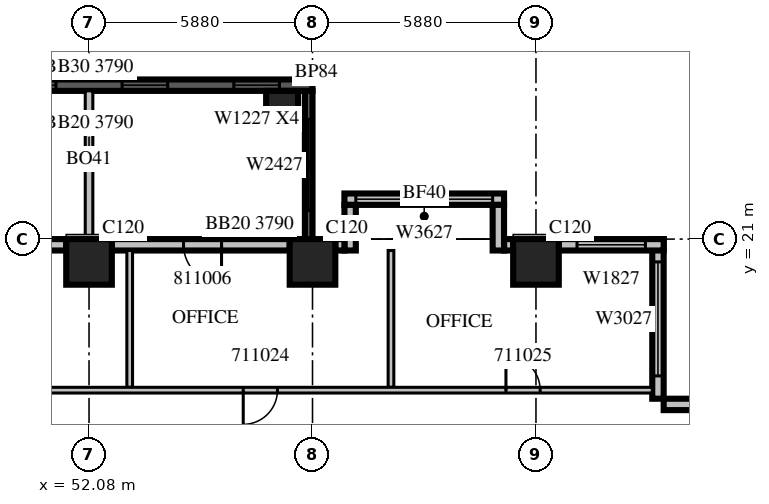
"""IFC4 building model, lengths in metres.
Left out: names, types, materials, properties, quantities, classifications, styles, units other than length and angle.
Written with IfcOpenShell. Run it as: python <this file> out.ifc"""

import sys

from ifc_helpers import new_model, si_unit, direction, frame, frame_2d, origin, origin_2d, place, context, subcontext, project, spatial, rectangle, extrude, source, transform, mapped, element, fill, save


model = new_model("IFC4")
c1 = context("Model", 3, precision=1e-05, world=origin(), true_north=direction((0.0, 1.0)))
c2 = subcontext(c1, "Body", "Model", "MODEL_VIEW")
j1 = project(units=[si_unit("LENGTHUNIT", "METRE"), si_unit("PLANEANGLEUNIT", "RADIAN")], contexts=[c1])
p1 = place(None, origin())
s1 = spatial("IfcSite", under=j1, at=p1, CompositionType="ELEMENT")
p2 = place(p1, origin())
s2 = spatial("IfcBuilding", under=s1, at=p2, CompositionType="ELEMENT")
p3 = place(p2, frame((0.0, 0.0, 57.3)))
s3 = spatial("IfcBuildingStorey", under=s2, at=p3, CompositionType="ELEMENT", Elevation=57.3)
m1 = source(origin(), c2, "Body", "SweptSolid", [
    extrude(rectangle(XDim=1.2, YDim=1.2, at=origin_2d()), origin(), (0.0, 0.0, 1.0), 4.2),
])
for number, where, z_axis, x_axis in (
    (1, (52.08, 20.4, 0.0), (0.0, 0.0, 1.0), (1.0, 0.0, 0.0)),
    (2, (57.96, 20.4, 0.0), (0.0, 0.0, 1.0), (1.0, 0.0, 0.0)),
    (3, (63.84, 20.4, 0.0), (0.0, 0.0, 1.0), (1.0, 0.0, 0.0)),
):
    element("IfcColumn", number, at=place(p3, frame(where, z_axis=z_axis, x_axis=x_axis)), inside=s3, PredefinedType="COLUMN", context=c2, shape_type="MappedRepresentation", body=[
        mapped(m1, transform((0.0, 0.0, 0.0), scale=1.0)),
    ])
m2 = source(origin(), c2, "Body", "SweptSolid", [
    extrude(rectangle(XDim=0.84, YDim=0.84, at=origin_2d()), origin(), (0.0, 0.0, 1.0), 4.2),
])
p4 = place(p3, frame((57.16, 24.48, 0.0), z_axis=(0.0, 0.0, 1.0), x_axis=(1.0, 0.0, 0.0)))
e4 = element("IfcColumn", 4, at=p4, inside=s3, PredefinedType="COLUMN", context=c2, shape_type="MappedRepresentation", body=[
    mapped(m2, transform((0.0, 0.0, 0.0), scale=1.0)),
])
m3 = source(origin(), c2, "Body", "SweptSolid", [
    extrude(rectangle(XDim=11.76, YDim=0.3, at=frame_2d((5.88, 0.0))), origin(), (0.0, 0.0, 1.0), 3.79),
])
p5 = place(p3, frame((57.96, 25.05, 0.0), z_axis=(0.0, 0.0, 1.0), x_axis=(-1.0, 0.0, 0.0)))
e5 = element("IfcWall", 5, at=p5, inside=s3, PredefinedType="SOLIDWALL", context=c2, shape_type="MappedRepresentation", body=[
    mapped(m3, transform((0.0, 0.0, 0.0), scale=1.0)),
])
m4 = source(origin(), c2, "Body", "SweptSolid", [
    extrude(rectangle(XDim=1.2, YDim=2.7, at=frame_2d((0.6, 1.35))), frame((0.0, 0.16, 0.0), z_axis=(0.0, -1.0, 0.0), x_axis=(1.0, 0.0, 0.0)), (0.0, 0.0, 1.0), 0.32),
])
p6 = place(p5, frame((0.87, 0.0, 0.6)))
e6 = element("IfcOpeningElement", 6, at=p6, cuts=e5, PredefinedType="OPENING", context=c2, shape_type="MappedRepresentation", body=[
    mapped(m4, transform((0.0, 0.0, 0.0), scale=1.0)),
])
p7 = place(p5, frame((3.81, 0.0, 0.6)))
e7 = element("IfcOpeningElement", 7, at=p7, cuts=e5, PredefinedType="OPENING", context=c2, shape_type="MappedRepresentation", body=[
    mapped(m4, transform((0.0, 0.0, 0.0), scale=1.0)),
])
p8 = place(p5, frame((6.75, 0.0, 0.6)))
e8 = element("IfcOpeningElement", 8, at=p8, cuts=e5, PredefinedType="OPENING", context=c2, shape_type="MappedRepresentation", body=[
    mapped(m4, transform((0.0, 0.0, 0.0), scale=1.0)),
])
p9 = place(p5, frame((9.69, 0.0, 0.6)))
e9 = element("IfcOpeningElement", 9, at=p9, cuts=e5, PredefinedType="OPENING", context=c2, shape_type="MappedRepresentation", body=[
    mapped(m4, transform((0.0, 0.0, 0.0), scale=1.0)),
])
m5 = source(origin(), c2, "Body", "SweptSolid", [
    extrude(rectangle(XDim=3.9, YDim=0.2, at=frame_2d((1.95, 0.0))), origin(), (0.0, 0.0, 1.0), 3.79),
])
p10 = place(p3, frame((52.08, 21.0, 0.0), z_axis=(0.0, 0.0, 1.0), x_axis=(0.0, 1.0, 0.0)))
e10 = element("IfcWall", 10, at=p10, inside=s3, PredefinedType="SOLIDWALL", context=c2, shape_type="MappedRepresentation", body=[
    mapped(m5, transform((0.0, 0.0, 0.0), scale=1.0)),
])
m6 = source(origin(), c2, "Body", "SweptSolid", [
    extrude(rectangle(XDim=3.9, YDim=0.2, at=frame_2d((1.95, 0.0))), origin(), (0.0, 0.0, 1.0), 3.79),
])
p11 = place(p3, frame((57.86, 21.0, 0.0), z_axis=(0.0, 0.0, 1.0), x_axis=(0.0, 1.0, 0.0)))
e11 = element("IfcWall", 11, at=p11, inside=s3, PredefinedType="SOLIDWALL", context=c2, shape_type="MappedRepresentation", body=[
    mapped(m6, transform((0.0, 0.0, 0.0), scale=1.0)),
])
m7 = source(origin(), c2, "Body", "SweptSolid", [
    extrude(rectangle(XDim=2.4, YDim=2.7, at=frame_2d((1.2, 1.35))), frame((0.0, 0.11, 0.0), z_axis=(0.0, -1.0, 0.0), x_axis=(1.0, 0.0, 0.0)), (0.0, 0.0, 1.0), 0.22),
])
p12 = place(p11, frame((0.75, 0.0, 0.6)))
e12 = element("IfcOpeningElement", 12, at=p12, cuts=e11, PredefinedType="OPENING", context=c2, shape_type="MappedRepresentation", body=[
    mapped(m7, transform((0.0, 0.0, 0.0), scale=1.0)),
])
m8 = source(origin(), c2, "Body", "SweptSolid", [
    extrude(rectangle(XDim=4.2, YDim=0.3, at=frame_2d((2.1, 0.0))), origin(), (0.0, 0.0, 1.0), 3.8),
])
p13 = place(p3, frame((71.4, 16.65, 0.0), z_axis=(0.0, 0.0, 1.0), x_axis=(-1.0, 0.0, 0.0)))
e13 = element("IfcWall", 13, at=p13, inside=s3, PredefinedType="STANDARD", context=c2, shape_type="MappedRepresentation", body=[
    mapped(m8, transform((0.0, 0.0, 0.0), scale=1.0)),
])
p14 = place(p13, frame((0.66, 0.0, 0.6)))
e14 = element("IfcOpeningElement", 14, at=p14, cuts=e13, PredefinedType="OPENING", context=c2, shape_type="MappedRepresentation", body=[
    mapped(m4, transform((0.0, 0.0, 0.0), scale=1.0)),
])
p15 = place(p3, frame((67.05, 16.8, 0.0), z_axis=(0.0, 0.0, 1.0), x_axis=(0.0, 1.0, 0.0)))
e15 = element("IfcWall", 15, at=p15, inside=s3, PredefinedType="STANDARD", context=c2, shape_type="MappedRepresentation", body=[
    mapped(m8, transform((0.0, 0.0, 0.0), scale=1.0)),
])
m9 = source(origin(), c2, "Body", "SweptSolid", [
    extrude(rectangle(XDim=3.0, YDim=2.7, at=frame_2d((1.5, 1.35))), frame((0.0, 0.16, 0.0), z_axis=(0.0, -1.0, 0.0), x_axis=(1.0, 0.0, 0.0)), (0.0, 0.0, 1.0), 0.32),
])
p16 = place(p15, frame((0.6, 0.0, 0.6)))
e16 = element("IfcOpeningElement", 16, at=p16, cuts=e15, PredefinedType="OPENING", context=c2, shape_type="MappedRepresentation", body=[
    mapped(m9, transform((0.0, 0.0, 0.0), scale=1.0)),
])
m10 = source(origin(), c2, "Body", "SweptSolid", [
    extrude(rectangle(XDim=2.76, YDim=0.3, at=frame_2d((1.38, 0.0))), origin(), (0.0, 0.0, 1.0), 3.8),
])
p17 = place(p3, frame((67.2, 20.85, 0.0), z_axis=(0.0, 0.0, 1.0), x_axis=(-1.0, 0.0, 0.0)))
e17 = element("IfcWall", 17, at=p17, inside=s3, PredefinedType="STANDARD", context=c2, shape_type="MappedRepresentation", body=[
    mapped(m10, transform((0.0, 0.0, 0.0), scale=1.0)),
])
m11 = source(origin(), c2, "Body", "SweptSolid", [
    extrude(rectangle(XDim=1.8, YDim=2.7, at=frame_2d((0.9, 1.35))), frame((0.0, 0.16, 0.0), z_axis=(0.0, -1.0, 0.0), x_axis=(1.0, 0.0, 0.0)), (0.0, 0.0, 1.0), 0.32),
])
p18 = place(p17, frame((0.48, 0.0, 0.6)))
e18 = element("IfcOpeningElement", 18, at=p18, cuts=e17, PredefinedType="OPENING", context=c2, shape_type="MappedRepresentation", body=[
    mapped(m11, transform((0.0, 0.0, 0.0), scale=1.0)),
])
m12 = source(origin(), c2, "Body", "SweptSolid", [
    extrude(rectangle(XDim=0.24, YDim=0.3, at=frame_2d((0.12, 0.0))), origin(), (0.0, 0.0, 1.0), 3.8),
])
p19 = place(p3, frame((63.24, 20.85, 0.0), z_axis=(0.0, 0.0, 1.0), x_axis=(-1.0, 0.0, 0.0)))
e19 = element("IfcWall", 19, at=p19, inside=s3, PredefinedType="STANDARD", context=c2, shape_type="MappedRepresentation", body=[
    mapped(m12, transform((0.0, 0.0, 0.0), scale=1.0)),
])
p20 = place(p3, frame((63.0, 22.05, 0.0), z_axis=(0.0, 0.0, 1.0), x_axis=(-1.0, 0.0, 0.0)))
e20 = element("IfcWall", 20, at=p20, inside=s3, PredefinedType="STANDARD", context=c2, shape_type="MappedRepresentation", body=[
    mapped(m8, transform((0.0, 0.0, 0.0), scale=1.0)),
])
m13 = source(origin(), c2, "Body", "SweptSolid", [
    extrude(rectangle(XDim=3.6, YDim=2.7, at=frame_2d((1.8, 1.35))), frame((0.0, 0.16, 0.0), z_axis=(0.0, -1.0, 0.0), x_axis=(1.0, 0.0, 0.0)), (0.0, 0.0, 1.0), 0.32),
])
p21 = place(p20, frame((0.3, 0.0, 0.6)))
e21 = element("IfcOpeningElement", 21, at=p21, cuts=e20, PredefinedType="OPENING", context=c2, shape_type="MappedRepresentation", body=[
    mapped(m13, transform((0.0, 0.0, 0.0), scale=1.0)),
])
m14 = source(origin(), c2, "Body", "SweptSolid", [
    extrude(rectangle(XDim=1.2, YDim=0.3, at=frame_2d((0.6, 0.0))), origin(), (0.0, 0.0, 1.0), 3.8),
])
for number, where, z_axis, x_axis in (
    (22, (62.85, 20.7, 0.0), (0.0, 0.0, 1.0), (0.0, 1.0, 0.0)),
    (23, (58.95, 20.7, 0.0), (0.0, 0.0, 1.0), (0.0, 1.0, 0.0)),
):
    element("IfcWall", number, at=place(p3, frame(where, z_axis=z_axis, x_axis=x_axis)), inside=s3, PredefinedType="STANDARD", context=c2, shape_type="MappedRepresentation", body=[
        mapped(m14, transform((0.0, 0.0, 0.0), scale=1.0)),
    ])
p22 = place(p3, frame((58.8, 20.85, 0.0), z_axis=(0.0, 0.0, 1.0), x_axis=(-1.0, 0.0, 0.0)))
e24 = element("IfcWall", 24, at=p22, inside=s3, PredefinedType="STANDARD", context=c2, shape_type="MappedRepresentation", body=[
    mapped(m12, transform((0.0, 0.0, 0.0), scale=1.0)),
])
m15 = source(origin(), c2, "Body", "SweptSolid", [
    extrude(rectangle(XDim=4.68, YDim=0.3, at=frame_2d((2.34, 0.0))), origin(), (0.0, 0.0, 1.0), 3.8),
])
p23 = place(p3, frame((57.36, 20.85, 0.0), z_axis=(0.0, 0.0, 1.0), x_axis=(-1.0, 0.0, 0.0)))
e25 = element("IfcWall", 25, at=p23, inside=s3, PredefinedType="STANDARD", context=c2, shape_type="MappedRepresentation", body=[
    mapped(m15, transform((0.0, 0.0, 0.0), scale=1.0)),
])
m16 = source(origin(), c2, "Body", "SweptSolid", [
    extrude(rectangle(XDim=1.0, YDim=2.1, at=frame_2d((0.5, 1.05))), frame((0.0, 0.16, 0.0), z_axis=(0.0, -1.0, 0.0), x_axis=(1.0, 0.0, 0.0)), (0.0, 0.0, 1.0), 0.32),
])
p24 = place(p23, frame((1.793, 0.0, 0.0)))
e26 = element("IfcOpeningElement", 26, at=p24, cuts=e25, PredefinedType="OPENING", context=c2, shape_type="MappedRepresentation", body=[
    mapped(m16, transform((0.0, 0.0, 0.0), scale=1.0)),
])
p25 = place(p3, frame((51.48, 20.85, 0.0), z_axis=(0.0, 0.0, 1.0), x_axis=(-1.0, 0.0, 0.0)))
e27 = element("IfcWall", 27, at=p25, inside=s3, PredefinedType="STANDARD", context=c2, shape_type="MappedRepresentation", body=[
    mapped(m15, transform((0.0, 0.0, 0.0), scale=1.0)),
])
p26 = place(p25, frame((1.887, 0.0, 0.0)))
e28 = element("IfcOpeningElement", 28, at=p26, cuts=e27, PredefinedType="OPENING", context=c2, shape_type="MappedRepresentation", body=[
    mapped(m16, transform((0.0, 0.0, 0.0), scale=1.0)),
])
m17 = source(origin(), c2, "Body", "SweptSolid", [
    extrude(rectangle(XDim=3.6, YDim=0.15, at=frame_2d((1.8, 0.0))), origin(), (0.0, 0.0, 1.0), 3.8),
])
for number, where, z_axis, x_axis in (
    (29, (53.15, 20.7, 0.0), (0.0, 0.0, 1.0), (0.0, -1.0, 0.0)),
    (30, (60.025, 20.7, 0.0), (0.0, 0.0, 1.0), (0.0, -1.0, 0.0)),
):
    element("IfcWall", number, at=place(p3, frame(where, z_axis=z_axis, x_axis=x_axis)), inside=s3, PredefinedType="PARTITIONING", context=c2, shape_type="MappedRepresentation", body=[
        mapped(m17, transform((0.0, 0.0, 0.0), scale=1.0)),
    ])
m18 = source(origin(), c2, "Body", "SweptSolid", [
    extrude(rectangle(XDim=37.5, YDim=0.15, at=frame_2d((18.75, 0.0))), origin(), (0.0, 0.0, 1.0), 3.8),
])
p27 = place(p3, frame((29.4, 17.025, 0.0), z_axis=(0.0, 0.0, 1.0), x_axis=(1.0, 0.0, 0.0)))
e31 = element("IfcWall", 31, at=p27, inside=s3, PredefinedType="PARTITIONING", context=c2, shape_type="MappedRepresentation", body=[
    mapped(m18, transform((0.0, 0.0, 0.0), scale=1.0)),
])
m19 = source(origin(), c2, "Body", "SweptSolid", [
    extrude(rectangle(XDim=1.0, YDim=2.1, at=frame_2d((0.5, 1.05))), frame((0.0, 0.085, 0.0), z_axis=(0.0, -1.0, 0.0), x_axis=(1.0, 0.0, 0.0)), (0.0, 0.0, 1.0), 0.17),
])
p28 = place(p27, frame((1.357, 0.0, 0.0)))
e32 = element("IfcOpeningElement", 32, at=p28, cuts=e31, PredefinedType="OPENING", context=c2, shape_type="MappedRepresentation", body=[
    mapped(m19, transform((0.0, 0.0, 0.0), scale=1.0)),
])
p29 = place(p27, frame((4.669, 0.0, 0.0)))
e33 = element("IfcOpeningElement", 33, at=p29, cuts=e31, PredefinedType="OPENING", context=c2, shape_type="MappedRepresentation", body=[
    mapped(m19, transform((0.0, 0.0, 0.0), scale=1.0)),
])
p30 = place(p27, frame((7.012, 0.0, 0.0)))
e34 = element("IfcOpeningElement", 34, at=p30, cuts=e31, PredefinedType="OPENING", context=c2, shape_type="MappedRepresentation", body=[
    mapped(m19, transform((0.0, 0.0, 0.0), scale=1.0)),
])
m20 = source(origin(), c2, "Body", "SweptSolid", [
    extrude(rectangle(XDim=0.9, YDim=2.1, at=frame_2d((0.45, 1.05))), frame((0.0, 0.085, 0.0), z_axis=(0.0, -1.0, 0.0), x_axis=(1.0, 0.0, 0.0)), (0.0, 0.0, 1.0), 0.17),
])
p31 = place(p27, frame((10.05, 0.0, 0.0)))
e35 = element("IfcOpeningElement", 35, at=p31, cuts=e31, PredefinedType="OPENING", context=c2, shape_type="MappedRepresentation", body=[
    mapped(m20, transform((0.0, 0.0, 0.0), scale=1.0)),
])
p32 = place(p27, frame((14.25, 0.0, 0.0)))
e36 = element("IfcOpeningElement", 36, at=p32, cuts=e31, PredefinedType="OPENING", context=c2, shape_type="MappedRepresentation", body=[
    mapped(m20, transform((0.0, 0.0, 0.0), scale=1.0)),
])
p33 = place(p27, frame((19.825, 0.0, 0.0)))
e37 = element("IfcOpeningElement", 37, at=p33, cuts=e31, PredefinedType="OPENING", context=c2, shape_type="MappedRepresentation", body=[
    mapped(m20, transform((0.0, 0.0, 0.0), scale=1.0)),
])
p34 = place(p27, frame((26.738, 0.0, 0.0)))
e38 = element("IfcOpeningElement", 38, at=p34, cuts=e31, PredefinedType="OPENING", context=c2, shape_type="MappedRepresentation", body=[
    mapped(m20, transform((0.0, 0.0, 0.0), scale=1.0)),
])
p35 = place(p27, frame((33.65, 0.0, 0.0)))
e39 = element("IfcOpeningElement", 39, at=p35, cuts=e31, PredefinedType="OPENING", context=c2, shape_type="MappedRepresentation", body=[
    mapped(m20, transform((0.0, 0.0, 0.0), scale=1.0)),
])
m21 = source(origin(), c2, "Body", "SweptSolid", [
    extrude(rectangle(XDim=1.2, YDim=2.7, at=frame_2d((0.6, 1.35))), frame((0.0, 0.03, 0.0), z_axis=(0.0, -1.0, 0.0), x_axis=(1.0, 0.0, 0.0)), (0.0, 0.0, 1.0), 0.06),
])
p36 = place(p6, origin())
e40 = element("IfcWindow", 40, at=p36, inside=s3, PartitioningType="SINGLE_PANEL", PredefinedType="WINDOW", context=c2, shape_type="MappedRepresentation", body=[
    mapped(m21, transform((0.0, 0.0, 0.0), scale=1.0)),
])
fill(e6, e40)
p37 = place(p7, origin())
e41 = element("IfcWindow", 41, at=p37, inside=s3, PartitioningType="SINGLE_PANEL", PredefinedType="WINDOW", context=c2, shape_type="MappedRepresentation", body=[
    mapped(m21, transform((0.0, 0.0, 0.0), scale=1.0)),
])
fill(e7, e41)
p38 = place(p8, origin())
e42 = element("IfcWindow", 42, at=p38, inside=s3, PartitioningType="SINGLE_PANEL", PredefinedType="WINDOW", context=c2, shape_type="MappedRepresentation", body=[
    mapped(m21, transform((0.0, 0.0, 0.0), scale=1.0)),
])
fill(e8, e42)
m22 = source(origin(), c2, "Body", "SweptSolid", [
    extrude(rectangle(XDim=2.4, YDim=2.7, at=frame_2d((1.2, 1.35))), frame((0.0, 0.03, 0.0), z_axis=(0.0, -1.0, 0.0), x_axis=(1.0, 0.0, 0.0)), (0.0, 0.0, 1.0), 0.06),
])
p39 = place(p12, origin())
e43 = element("IfcWindow", 43, at=p39, inside=s3, PartitioningType="SINGLE_PANEL", PredefinedType="WINDOW", context=c2, shape_type="MappedRepresentation", body=[
    mapped(m22, transform((0.0, 0.0, 0.0), scale=1.0)),
])
fill(e12, e43)
m23 = source(origin(), c2, "Body", "SweptSolid", [
    extrude(rectangle(XDim=3.0, YDim=2.7, at=frame_2d((1.5, 1.35))), frame((0.0, 0.03, 0.0), z_axis=(0.0, -1.0, 0.0), x_axis=(1.0, 0.0, 0.0)), (0.0, 0.0, 1.0), 0.06),
])
p40 = place(p16, origin())
e44 = element("IfcWindow", 44, at=p40, inside=s3, PartitioningType="SINGLE_PANEL", PredefinedType="WINDOW", context=c2, shape_type="MappedRepresentation", body=[
    mapped(m23, transform((0.0, 0.0, 0.0), scale=1.0)),
])
fill(e16, e44)
m24 = source(origin(), c2, "Body", "SweptSolid", [
    extrude(rectangle(XDim=1.8, YDim=2.7, at=frame_2d((0.9, 1.35))), frame((0.0, 0.03, 0.0), z_axis=(0.0, -1.0, 0.0), x_axis=(1.0, 0.0, 0.0)), (0.0, 0.0, 1.0), 0.06),
])
p41 = place(p18, origin())
e45 = element("IfcWindow", 45, at=p41, inside=s3, PartitioningType="SINGLE_PANEL", PredefinedType="WINDOW", context=c2, shape_type="MappedRepresentation", body=[
    mapped(m24, transform((0.0, 0.0, 0.0), scale=1.0)),
])
fill(e18, e45)
m25 = source(origin(), c2, "Body", "SweptSolid", [
    extrude(rectangle(XDim=3.6, YDim=2.7, at=frame_2d((1.8, 1.35))), frame((0.0, 0.03, 0.0), z_axis=(0.0, -1.0, 0.0), x_axis=(1.0, 0.0, 0.0)), (0.0, 0.0, 1.0), 0.06),
])
p42 = place(p21, origin())
e46 = element("IfcWindow", 46, at=p42, inside=s3, PartitioningType="SINGLE_PANEL", PredefinedType="WINDOW", context=c2, shape_type="MappedRepresentation", body=[
    mapped(m25, transform((0.0, 0.0, 0.0), scale=1.0)),
])
fill(e21, e46)
m26 = source(origin(), c2, "Body", "SweptSolid", [
    extrude(rectangle(XDim=0.9, YDim=2.1, at=frame_2d((0.45, 1.05))), frame((0.0, 0.025, 0.0), z_axis=(0.0, -1.0, 0.0), x_axis=(1.0, 0.0, 0.0)), (0.0, 0.0, 1.0), 0.05),
])
p43 = place(p34, origin())
e47 = element("IfcDoor", 47, at=p43, inside=s3, OperationType="SINGLE_SWING_RIGHT", PredefinedType="DOOR", context=c2, shape_type="MappedRepresentation", body=[
    mapped(m26, transform((0.0, 0.0, 0.0), scale=1.0)),
])
fill(e38, e47)
p44 = place(p35, origin())
e48 = element("IfcDoor", 48, at=p44, inside=s3, OperationType="SINGLE_SWING_LEFT", PredefinedType="DOOR", context=c2, shape_type="MappedRepresentation", body=[
    mapped(m26, transform((0.0, 0.0, 0.0), scale=1.0)),
])
fill(e39, e48)
m27 = source(origin(), c2, "Body", "SweptSolid", [
    extrude(rectangle(XDim=1.0, YDim=2.1, at=frame_2d((0.5, 1.05))), frame((0.0, 0.025, 0.0), z_axis=(0.0, -1.0, 0.0), x_axis=(1.0, 0.0, 0.0)), (0.0, 0.0, 1.0), 0.05),
])
p45 = place(p24, origin())
e49 = element("IfcDoor", 49, at=p45, inside=s3, OperationType="SINGLE_SWING_LEFT", PredefinedType="DOOR", context=c2, shape_type="MappedRepresentation", body=[
    mapped(m27, transform((0.0, 0.0, 0.0), scale=1.0)),
])
fill(e26, e49)
save(model, sys.argv[1])
